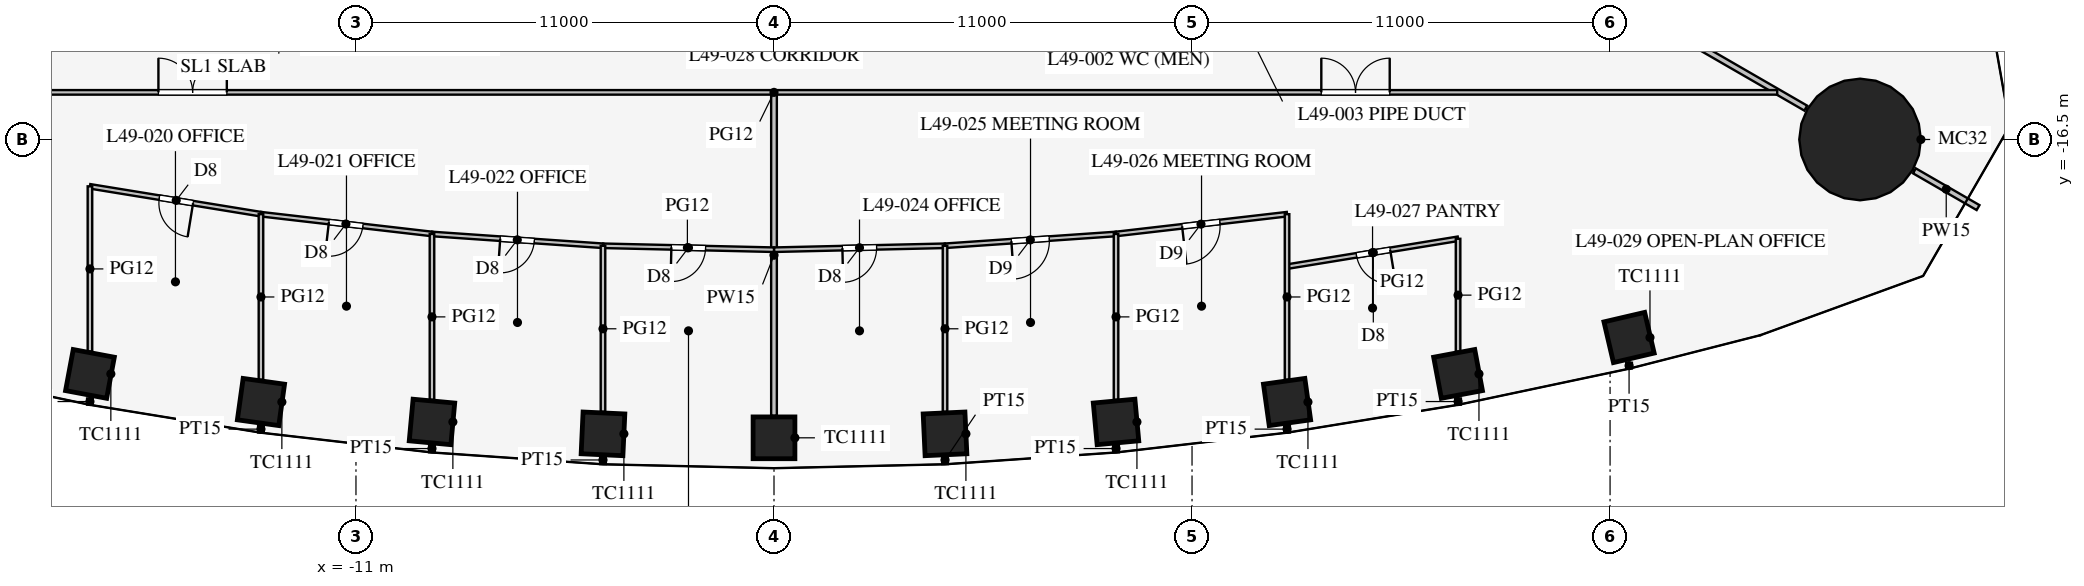
"""IFC4 building model, lengths in metres.
Left out: names, types, materials, properties, quantities, classifications, styles, units other than length and angle.
Written with IfcOpenShell. Run it as: python <this file> out.ifc"""

import sys

from ifc_helpers import new_model, si_unit, direction, frame, frame_2d, origin, origin_2d, place, context, subcontext, project, spatial, rectangle, circle, extrude, element, fill, save


model = new_model("IFC4")
c1 = context("Model", 3, precision=1e-05, world=origin(), true_north=direction((0.0, 1.0)))
c2 = subcontext(c1, "Body", "Model", "MODEL_VIEW")
j1 = project(units=[si_unit("LENGTHUNIT", "METRE"), si_unit("PLANEANGLEUNIT", "RADIAN")], contexts=[c1])
p1 = place(None, origin())
s1 = spatial("IfcSite", under=j1, at=p1, CompositionType="ELEMENT")
p2 = place(p1, origin())
s2 = spatial("IfcBuilding", under=s1, at=p2, CompositionType="ELEMENT")
p3 = place(p2, frame((0.0, 0.0, 214.9)))
s3 = spatial("IfcBuildingStorey", under=s2, at=p3, CompositionType="ELEMENT", Elevation=214.9)
for number, where, z_axis, x_axis in (
    (1, (-18.0, -22.669, 0.0), (0.0, 0.0, 1.0), (0.983, -0.184, 0.0)),
    (2, (-13.5, -23.408, 0.0), (0.0, 0.0, 1.0), (0.99, -0.138, 0.0)),
    (3, (-9.0, -23.933, 0.0), (0.0, 0.0, 1.0), (0.996, -0.092, 0.0)),
    (4, (-4.5, -24.246, 0.0), (0.0, 0.0, 1.0), (0.999, -0.046, 0.0)),
    (5, (0.0, -24.351, 0.0), (0.0, 0.0, 1.0), (1.0, 0.0, 0.0)),
    (6, (4.5, -24.246, 0.0), (0.0, 0.0, 1.0), (0.999, 0.046, 0.0)),
    (7, (9.0, -23.933, 0.0), (0.0, 0.0, 1.0), (0.996, 0.092, 0.0)),
    (8, (13.5, -23.408, 0.0), (0.0, 0.0, 1.0), (0.99, 0.138, 0.0)),
    (9, (18.0, -22.669, 0.0), (0.0, 0.0, 1.0), (0.983, 0.184, 0.0)),
    (10, (22.5, -21.71, 0.0), (0.0, 0.0, 1.0), (0.974, 0.227, 0.0)),
):
    element("IfcColumn", number, at=place(p3, frame(where, z_axis=z_axis, x_axis=x_axis)), inside=s3, PredefinedType="COLUMN", context=c2, shape_type="SweptSolid", body=[
        extrude(rectangle(XDim=1.1, YDim=1.1, at=origin_2d()), origin(), (0.0, 0.0, 1.0), 4.2),
    ])
p4 = place(p3, frame((28.579, -16.5, 0.0), z_axis=(0.0, 0.0, 1.0), x_axis=(1.0, 0.0, 0.0)))
e11 = element("IfcColumn", 11, at=p4, inside=s3, PredefinedType="COLUMN", context=c2, shape_type="SweptSolid", body=[
    extrude(circle(Radius=1.6, at=origin_2d()), origin(), (0.0, 0.0, 1.0), 4.2),
])
p5 = place(p3, frame((14.203, -8.2, 0.0), z_axis=(0.0, 0.0, 1.0), x_axis=(0.866021600284, -0.500006587798, 0.0)))
e12 = element("IfcWall", 12, at=p5, inside=s3, PredefinedType="PARTITIONING", context=c2, shape_type="SweptSolid", body=[
    extrude(rectangle(XDim=14.95, YDim=0.15, at=frame_2d((7.475, 0.0))), origin(), (0.0, 0.0, 1.0), 2.4),
])
p6 = place(p3, frame((30.008, -17.325, 0.0), z_axis=(0.0, 0.0, 1.0), x_axis=(0.866013246922, -0.500021055713, 0.0)))
e13 = element("IfcWall", 13, at=p6, inside=s3, PredefinedType="PARTITIONING", context=c2, shape_type="SweptSolid", body=[
    extrude(rectangle(XDim=1.935, YDim=0.15, at=frame_2d((0.967, 0.0))), origin(), (0.0, 0.0, 1.0), 2.4),
])
p7 = place(p3, frame((-14.203, -8.2, 0.0), z_axis=(0.0, 0.0, 1.0), x_axis=(-0.866021600284, -0.500006587798, 0.0)))
e14 = element("IfcWall", 14, at=p7, inside=s3, PredefinedType="PARTITIONING", context=c2, shape_type="SweptSolid", body=[
    extrude(rectangle(XDim=14.95, YDim=0.15, at=frame_2d((7.475, 0.0))), origin(), (0.0, 0.0, 1.0), 2.4),
])
p8 = place(p3, frame((0.0, -15.32, 0.0), z_axis=(0.0, 0.0, 1.0), x_axis=(0.0, -1.0, 0.0)))
e15 = element("IfcWall", 15, at=p8, inside=s3, PredefinedType="PARTITIONING", context=c2, shape_type="SweptSolid", body=[
    extrude(rectangle(XDim=8.451, YDim=0.15, at=frame_2d((4.225, 0.0))), origin(), (0.0, 0.0, 1.0), 3.3),
])
p9 = place(p3, frame((-26.398, -15.26, 0.0), z_axis=(0.0, 0.0, 1.0), x_axis=(1.0, 0.0, 0.0)))
e16 = element("IfcWall", 16, at=p9, inside=s3, PredefinedType="PARTITIONING", context=c2, shape_type="SweptSolid", body=[
    extrude(rectangle(XDim=52.796, YDim=0.12, at=frame_2d((26.398, 0.0))), origin(), (0.0, 0.0, 1.0), 2.9),
])
p10 = place(p9, frame((10.2, 0.0, 0.15)))
e17 = element("IfcOpeningElement", 17, at=p10, cuts=e16, PredefinedType="OPENING", context=c2, shape_type="SweptSolid", body=[
    extrude(rectangle(XDim=1.8, YDim=2.1, at=frame_2d((0.9, 1.05))), frame((0.0, 0.07, 0.0), z_axis=(0.0, -1.0, 0.0), x_axis=(1.0, 0.0, 0.0)), (0.0, 0.0, 1.0), 0.14),
])
p11 = place(p9, frame((40.8, 0.0, 0.15)))
e18 = element("IfcOpeningElement", 18, at=p11, cuts=e16, PredefinedType="OPENING", context=c2, shape_type="SweptSolid", body=[
    extrude(rectangle(XDim=1.8, YDim=2.1, at=frame_2d((0.9, 1.05))), frame((0.0, 0.07, 0.0), z_axis=(0.0, -1.0, 0.0), x_axis=(1.0, 0.0, 0.0)), (0.0, 0.0, 1.0), 0.14),
])
p12 = place(p3, frame((13.5, -24.033, 0.0), z_axis=(0.0, 0.0, 1.0), x_axis=(0.0, -1.0, 0.0)))
e19 = element("IfcWall", 19, at=p12, inside=s3, PredefinedType="PARTITIONING", context=c2, shape_type="SweptSolid", body=[
    extrude(rectangle(XDim=0.178, YDim=0.15, at=frame_2d((0.089, 0.0))), origin(), (0.0, 0.0, 1.0), 2.9),
])
p13 = place(p3, frame((18.0, -23.315, 0.0), z_axis=(0.0, 0.0, 1.0), x_axis=(0.0, -1.0, 0.0)))
e20 = element("IfcWall", 20, at=p13, inside=s3, PredefinedType="PARTITIONING", context=c2, shape_type="SweptSolid", body=[
    extrude(rectangle(XDim=0.163, YDim=0.15, at=frame_2d((0.082, 0.0))), origin(), (0.0, 0.0, 1.0), 2.9),
])
p14 = place(p3, frame((22.5, -22.375, 0.0), z_axis=(0.0, 0.0, 1.0), x_axis=(0.0, -1.0, 0.0)))
e21 = element("IfcWall", 21, at=p14, inside=s3, PredefinedType="PARTITIONING", context=c2, shape_type="SweptSolid", body=[
    extrude(rectangle(XDim=0.152, YDim=0.15, at=frame_2d((0.076, 0.0))), origin(), (0.0, 0.0, 1.0), 2.9),
])
p15 = place(p3, frame((4.5, -24.825, 0.0), z_axis=(0.0, 0.0, 1.0), x_axis=(0.0, -1.0, 0.0)))
e22 = element("IfcWall", 22, at=p15, inside=s3, PredefinedType="PARTITIONING", context=c2, shape_type="SweptSolid", body=[
    extrude(rectangle(XDim=0.217, YDim=0.15, at=frame_2d((0.108, 0.0))), origin(), (0.0, 0.0, 1.0), 2.9),
])
p16 = place(p3, frame((9.0, -24.535, 0.0), z_axis=(0.0, 0.0, 1.0), x_axis=(0.0, -1.0, 0.0)))
e23 = element("IfcWall", 23, at=p16, inside=s3, PredefinedType="PARTITIONING", context=c2, shape_type="SweptSolid", body=[
    extrude(rectangle(XDim=0.196, YDim=0.15, at=frame_2d((0.098, 0.0))), origin(), (0.0, 0.0, 1.0), 2.9),
])
p17 = place(p3, frame((-13.5, -24.033, 0.0), z_axis=(0.0, 0.0, 1.0), x_axis=(0.0, -1.0, 0.0)))
e24 = element("IfcWall", 24, at=p17, inside=s3, PredefinedType="PARTITIONING", context=c2, shape_type="SweptSolid", body=[
    extrude(rectangle(XDim=0.178, YDim=0.15, at=frame_2d((0.089, 0.0))), origin(), (0.0, 0.0, 1.0), 2.9),
])
p18 = place(p3, frame((-18.0, -23.315, 0.0), z_axis=(0.0, 0.0, 1.0), x_axis=(0.0, -1.0, 0.0)))
e25 = element("IfcWall", 25, at=p18, inside=s3, PredefinedType="PARTITIONING", context=c2, shape_type="SweptSolid", body=[
    extrude(rectangle(XDim=0.163, YDim=0.15, at=frame_2d((0.082, 0.0))), origin(), (0.0, 0.0, 1.0), 2.9),
])
p19 = place(p3, frame((-4.5, -24.825, 0.0), z_axis=(0.0, 0.0, 1.0), x_axis=(0.0, -1.0, 0.0)))
e26 = element("IfcWall", 26, at=p19, inside=s3, PredefinedType="PARTITIONING", context=c2, shape_type="SweptSolid", body=[
    extrude(rectangle(XDim=0.217, YDim=0.15, at=frame_2d((0.108, 0.0))), origin(), (0.0, 0.0, 1.0), 2.9),
])
p20 = place(p3, frame((-9.0, -24.535, 0.0), z_axis=(0.0, 0.0, 1.0), x_axis=(0.0, -1.0, 0.0)))
e27 = element("IfcWall", 27, at=p20, inside=s3, PredefinedType="PARTITIONING", context=c2, shape_type="SweptSolid", body=[
    extrude(rectangle(XDim=0.196, YDim=0.15, at=frame_2d((0.098, 0.0))), origin(), (0.0, 0.0, 1.0), 2.9),
])
p21 = place(p3, frame((0.0, -19.401, 0.0), z_axis=(0.0, 0.0, 1.0), x_axis=(0.99973552509, 0.022997388381, 0.0)))
e28 = element("IfcWall", 28, at=p21, inside=s3, PredefinedType="PARTITIONING", context=c2, shape_type="SweptSolid", body=[
    extrude(rectangle(XDim=4.501, YDim=0.12, at=frame_2d((2.25, 0.0))), origin(), (0.0, 0.0, 1.0), 2.9),
])
p22 = place(p21, frame((1.8, 0.0, 0.15)))
e29 = element("IfcOpeningElement", 29, at=p22, cuts=e28, PredefinedType="OPENING", context=c2, shape_type="SweptSolid", body=[
    extrude(rectangle(XDim=0.9, YDim=2.1, at=frame_2d((0.45, 1.05))), frame((0.0, 0.07, 0.0), z_axis=(0.0, -1.0, 0.0), x_axis=(1.0, 0.0, 0.0)), (0.0, 0.0, 1.0), 0.14),
])
p23 = place(p3, frame((13.5, -19.846, 0.0), z_axis=(0.0, 0.0, 1.0), x_axis=(0.986986525477, 0.160802980469, 0.0)))
e30 = element("IfcWall", 30, at=p23, inside=s3, PredefinedType="PARTITIONING", context=c2, shape_type="SweptSolid", body=[
    extrude(rectangle(XDim=4.559, YDim=0.12, at=frame_2d((2.28, 0.0))), origin(), (0.0, 0.0, 1.0), 2.9),
])
p24 = place(p23, frame((1.85, 0.0, 0.15)))
e31 = element("IfcOpeningElement", 31, at=p24, cuts=e30, PredefinedType="OPENING", context=c2, shape_type="SweptSolid", body=[
    extrude(rectangle(XDim=0.9, YDim=2.1, at=frame_2d((0.45, 1.05))), frame((0.0, 0.07, 0.0), z_axis=(0.0, -1.0, 0.0), x_axis=(1.0, 0.0, 0.0)), (0.0, 0.0, 1.0), 0.14),
])
p25 = place(p3, frame((4.5, -19.297, 0.0), z_axis=(0.0, 0.0, 1.0), x_axis=(0.997623533978, 0.068900540297, 0.0)))
e32 = element("IfcWall", 32, at=p25, inside=s3, PredefinedType="PARTITIONING", context=c2, shape_type="SweptSolid", body=[
    extrude(rectangle(XDim=4.511, YDim=0.12, at=frame_2d((2.255, 0.0))), origin(), (0.0, 0.0, 1.0), 2.9),
])
p26 = place(p25, frame((1.75, 0.0, 0.15)))
e33 = element("IfcOpeningElement", 33, at=p26, cuts=e32, PredefinedType="OPENING", context=c2, shape_type="SweptSolid", body=[
    extrude(rectangle(XDim=1.0, YDim=2.1, at=frame_2d((0.5, 1.05))), frame((0.0, 0.07, 0.0), z_axis=(0.0, -1.0, 0.0), x_axis=(1.0, 0.0, 0.0)), (0.0, 0.0, 1.0), 0.14),
])
p27 = place(p3, frame((9.0, -18.986, 0.0), z_axis=(0.0, 0.0, 1.0), x_axis=(0.993382946625, 0.114849124309, 0.0)))
e34 = element("IfcWall", 34, at=p27, inside=s3, PredefinedType="PARTITIONING", context=c2, shape_type="SweptSolid", body=[
    extrude(rectangle(XDim=4.53, YDim=0.12, at=frame_2d((2.265, 0.0))), origin(), (0.0, 0.0, 1.0), 2.9),
])
p28 = place(p27, frame((1.75, 0.0, 0.15)))
e35 = element("IfcOpeningElement", 35, at=p28, cuts=e34, PredefinedType="OPENING", context=c2, shape_type="SweptSolid", body=[
    extrude(rectangle(XDim=1.0, YDim=2.1, at=frame_2d((0.5, 1.05))), frame((0.0, 0.07, 0.0), z_axis=(0.0, -1.0, 0.0), x_axis=(1.0, 0.0, 0.0)), (0.0, 0.0, 1.0), 0.14),
])
p29 = place(p3, frame((-13.5, -18.466, 0.0), z_axis=(0.0, 0.0, 1.0), x_axis=(0.993382946625, -0.114849124309, 0.0)))
e36 = element("IfcWall", 36, at=p29, inside=s3, PredefinedType="PARTITIONING", context=c2, shape_type="SweptSolid", body=[
    extrude(rectangle(XDim=4.53, YDim=0.12, at=frame_2d((2.265, 0.0))), origin(), (0.0, 0.0, 1.0), 2.9),
])
p30 = place(p29, frame((1.8, 0.0, 0.15)))
e37 = element("IfcOpeningElement", 37, at=p30, cuts=e36, PredefinedType="OPENING", context=c2, shape_type="SweptSolid", body=[
    extrude(rectangle(XDim=0.9, YDim=2.1, at=frame_2d((0.45, 1.05))), frame((0.0, 0.07, 0.0), z_axis=(0.0, -1.0, 0.0), x_axis=(1.0, 0.0, 0.0)), (0.0, 0.0, 1.0), 0.14),
])
p31 = place(p3, frame((-18.0, -17.733, 0.0), z_axis=(0.0, 0.0, 1.0), x_axis=(0.986986525477, -0.160802980469, 0.0)))
e38 = element("IfcWall", 38, at=p31, inside=s3, PredefinedType="PARTITIONING", context=c2, shape_type="SweptSolid", body=[
    extrude(rectangle(XDim=4.559, YDim=0.12, at=frame_2d((2.28, 0.0))), origin(), (0.0, 0.0, 1.0), 2.9),
])
p32 = place(p31, frame((1.85, 0.0, 0.15)))
e39 = element("IfcOpeningElement", 39, at=p32, cuts=e38, PredefinedType="OPENING", context=c2, shape_type="SweptSolid", body=[
    extrude(rectangle(XDim=0.9, YDim=2.1, at=frame_2d((0.45, 1.05))), frame((0.0, 0.07, 0.0), z_axis=(0.0, -1.0, 0.0), x_axis=(1.0, 0.0, 0.0)), (0.0, 0.0, 1.0), 0.14),
])
p33 = place(p3, frame((-4.5, -19.297, 0.0), z_axis=(0.0, 0.0, 1.0), x_axis=(0.99973552509, -0.022997388381, 0.0)))
e40 = element("IfcWall", 40, at=p33, inside=s3, PredefinedType="PARTITIONING", context=c2, shape_type="SweptSolid", body=[
    extrude(rectangle(XDim=4.501, YDim=0.12, at=frame_2d((2.25, 0.0))), origin(), (0.0, 0.0, 1.0), 2.9),
])
p34 = place(p33, frame((1.8, 0.0, 0.15)))
e41 = element("IfcOpeningElement", 41, at=p34, cuts=e40, PredefinedType="OPENING", context=c2, shape_type="SweptSolid", body=[
    extrude(rectangle(XDim=0.9, YDim=2.1, at=frame_2d((0.45, 1.05))), frame((0.0, 0.07, 0.0), z_axis=(0.0, -1.0, 0.0), x_axis=(1.0, 0.0, 0.0)), (0.0, 0.0, 1.0), 0.14),
])
p35 = place(p3, frame((-9.0, -18.986, 0.0), z_axis=(0.0, 0.0, 1.0), x_axis=(0.997623533978, -0.068900540297, 0.0)))
e42 = element("IfcWall", 42, at=p35, inside=s3, PredefinedType="PARTITIONING", context=c2, shape_type="SweptSolid", body=[
    extrude(rectangle(XDim=4.511, YDim=0.12, at=frame_2d((2.255, 0.0))), origin(), (0.0, 0.0, 1.0), 2.9),
])
p36 = place(p35, frame((1.8, 0.0, 0.15)))
e43 = element("IfcOpeningElement", 43, at=p36, cuts=e42, PredefinedType="OPENING", context=c2, shape_type="SweptSolid", body=[
    extrude(rectangle(XDim=0.9, YDim=2.1, at=frame_2d((0.45, 1.05))), frame((0.0, 0.07, 0.0), z_axis=(0.0, -1.0, 0.0), x_axis=(1.0, 0.0, 0.0)), (0.0, 0.0, 1.0), 0.14),
])
p37 = place(p3, frame((13.5, -18.466, 0.0), z_axis=(0.0, 0.0, 1.0), x_axis=(0.0, -1.0, 0.0)))
e44 = element("IfcWall", 44, at=p37, inside=s3, PredefinedType="PARTITIONING", context=c2, shape_type="SweptSolid", body=[
    extrude(rectangle(XDim=4.357, YDim=0.12, at=frame_2d((2.178, 0.0))), origin(), (0.0, 0.0, 1.0), 2.9),
])
p38 = place(p3, frame((18.0, -19.113, 0.0), z_axis=(0.0, 0.0, 1.0), x_axis=(0.0, -1.0, 0.0)))
e45 = element("IfcWall", 45, at=p38, inside=s3, PredefinedType="PARTITIONING", context=c2, shape_type="SweptSolid", body=[
    extrude(rectangle(XDim=2.966, YDim=0.12, at=frame_2d((1.483, 0.0))), origin(), (0.0, 0.0, 1.0), 2.9),
])
p39 = place(p3, frame((4.5, -19.297, 0.0), z_axis=(0.0, 0.0, 1.0), x_axis=(0.0, -1.0, 0.0)))
e46 = element("IfcWall", 46, at=p39, inside=s3, PredefinedType="PARTITIONING", context=c2, shape_type="SweptSolid", body=[
    extrude(rectangle(XDim=4.369, YDim=0.12, at=frame_2d((2.184, 0.0))), origin(), (0.0, 0.0, 1.0), 2.9),
])
p40 = place(p3, frame((9.0, -18.986, 0.0), z_axis=(0.0, 0.0, 1.0), x_axis=(0.0, -1.0, 0.0)))
e47 = element("IfcWall", 47, at=p40, inside=s3, PredefinedType="PARTITIONING", context=c2, shape_type="SweptSolid", body=[
    extrude(rectangle(XDim=4.364, YDim=0.12, at=frame_2d((2.182, 0.0))), origin(), (0.0, 0.0, 1.0), 2.9),
])
p41 = place(p3, frame((-13.5, -18.466, 0.0), z_axis=(0.0, 0.0, 1.0), x_axis=(0.0, -1.0, 0.0)))
e48 = element("IfcWall", 48, at=p41, inside=s3, PredefinedType="PARTITIONING", context=c2, shape_type="SweptSolid", body=[
    extrude(rectangle(XDim=4.357, YDim=0.12, at=frame_2d((2.178, 0.0))), origin(), (0.0, 0.0, 1.0), 2.9),
])
p42 = place(p3, frame((-18.0, -17.733, 0.0), z_axis=(0.0, 0.0, 1.0), x_axis=(0.0, -1.0, 0.0)))
e49 = element("IfcWall", 49, at=p42, inside=s3, PredefinedType="PARTITIONING", context=c2, shape_type="SweptSolid", body=[
    extrude(rectangle(XDim=4.346, YDim=0.12, at=frame_2d((2.173, 0.0))), origin(), (0.0, 0.0, 1.0), 2.9),
])
p43 = place(p3, frame((-4.5, -19.297, 0.0), z_axis=(0.0, 0.0, 1.0), x_axis=(0.0, -1.0, 0.0)))
e50 = element("IfcWall", 50, at=p43, inside=s3, PredefinedType="PARTITIONING", context=c2, shape_type="SweptSolid", body=[
    extrude(rectangle(XDim=4.369, YDim=0.12, at=frame_2d((2.184, 0.0))), origin(), (0.0, 0.0, 1.0), 2.9),
])
p44 = place(p3, frame((-9.0, -18.986, 0.0), z_axis=(0.0, 0.0, 1.0), x_axis=(0.0, -1.0, 0.0)))
e51 = element("IfcWall", 51, at=p44, inside=s3, PredefinedType="PARTITIONING", context=c2, shape_type="SweptSolid", body=[
    extrude(rectangle(XDim=4.364, YDim=0.12, at=frame_2d((2.182, 0.0))), origin(), (0.0, 0.0, 1.0), 2.9),
])
p45 = place(p3, frame((-0.016, 30.491, 0.0), z_axis=(0.0, 0.0, 1.0), x_axis=(-0.50000091641, -0.866024874695, 0.0)))
e52 = element("IfcWall", 52, at=p45, inside=s3, PredefinedType="PARTITIONING", context=c2, shape_type="SweptSolid", body=[
    extrude(rectangle(XDim=52.796, YDim=0.12, at=frame_2d((26.398, 0.0))), origin(), (0.0, 0.0, 1.0), 2.9),
])
p46 = place(p45, frame((10.2, 0.0, 0.15)))
e53 = element("IfcOpeningElement", 53, at=p46, cuts=e52, PredefinedType="OPENING", context=c2, shape_type="SweptSolid", body=[
    extrude(rectangle(XDim=1.8, YDim=2.1, at=frame_2d((0.9, 1.05))), frame((0.0, 0.07, 0.0), z_axis=(0.0, -1.0, 0.0), x_axis=(1.0, 0.0, 0.0)), (0.0, 0.0, 1.0), 0.14),
])
p47 = place(p45, frame((40.8, 0.0, 0.15)))
e54 = element("IfcOpeningElement", 54, at=p47, cuts=e52, PredefinedType="OPENING", context=c2, shape_type="SweptSolid", body=[
    extrude(rectangle(XDim=1.8, YDim=2.1, at=frame_2d((0.9, 1.05))), frame((0.0, 0.07, 0.0), z_axis=(0.0, -1.0, 0.0), x_axis=(1.0, 0.0, 0.0)), (0.0, 0.0, 1.0), 0.14),
])
p48 = place(p32, frame((0.9, 0.0, 0.0), z_axis=(0.0, 0.0, 1.0), x_axis=(-1.0, 0.0, 0.0)))
e55 = element("IfcDoor", 55, at=p48, inside=s3, OperationType="SINGLE_SWING_LEFT", PredefinedType="DOOR", context=c2, shape_type="SweptSolid", body=[
    extrude(rectangle(XDim=0.9, YDim=2.1, at=frame_2d((0.45, 1.05))), frame((0.0, 0.025, 0.0), z_axis=(0.0, -1.0, 0.0), x_axis=(1.0, 0.0, 0.0)), (0.0, 0.0, 1.0), 0.05),
])
fill(e39, e55)
p49 = place(p30, frame((0.9, 0.0, 0.0), z_axis=(0.0, 0.0, 1.0), x_axis=(-1.0, 0.0, 0.0)))
e56 = element("IfcDoor", 56, at=p49, inside=s3, OperationType="SINGLE_SWING_RIGHT", PredefinedType="DOOR", context=c2, shape_type="SweptSolid", body=[
    extrude(rectangle(XDim=0.9, YDim=2.1, at=frame_2d((0.45, 1.05))), frame((0.0, 0.025, 0.0), z_axis=(0.0, -1.0, 0.0), x_axis=(1.0, 0.0, 0.0)), (0.0, 0.0, 1.0), 0.05),
])
fill(e37, e56)
p50 = place(p36, frame((0.9, 0.0, 0.0), z_axis=(0.0, 0.0, 1.0), x_axis=(-1.0, 0.0, 0.0)))
e57 = element("IfcDoor", 57, at=p50, inside=s3, OperationType="SINGLE_SWING_RIGHT", PredefinedType="DOOR", context=c2, shape_type="SweptSolid", body=[
    extrude(rectangle(XDim=0.9, YDim=2.1, at=frame_2d((0.45, 1.05))), frame((0.0, 0.025, 0.0), z_axis=(0.0, -1.0, 0.0), x_axis=(1.0, 0.0, 0.0)), (0.0, 0.0, 1.0), 0.05),
])
fill(e43, e57)
p51 = place(p34, frame((0.9, 0.0, 0.0), z_axis=(0.0, 0.0, 1.0), x_axis=(-1.0, 0.0, 0.0)))
e58 = element("IfcDoor", 58, at=p51, inside=s3, OperationType="SINGLE_SWING_RIGHT", PredefinedType="DOOR", context=c2, shape_type="SweptSolid", body=[
    extrude(rectangle(XDim=0.9, YDim=2.1, at=frame_2d((0.45, 1.05))), frame((0.0, 0.025, 0.0), z_axis=(0.0, -1.0, 0.0), x_axis=(1.0, 0.0, 0.0)), (0.0, 0.0, 1.0), 0.05),
])
fill(e41, e58)
p52 = place(p22, frame((0.9, 0.0, 0.0), z_axis=(0.0, 0.0, 1.0), x_axis=(-1.0, 0.0, 0.0)))
e59 = element("IfcDoor", 59, at=p52, inside=s3, OperationType="SINGLE_SWING_RIGHT", PredefinedType="DOOR", context=c2, shape_type="SweptSolid", body=[
    extrude(rectangle(XDim=0.9, YDim=2.1, at=frame_2d((0.45, 1.05))), frame((0.0, 0.025, 0.0), z_axis=(0.0, -1.0, 0.0), x_axis=(1.0, 0.0, 0.0)), (0.0, 0.0, 1.0), 0.05),
])
fill(e29, e59)
p53 = place(p26, frame((1.0, 0.0, 0.0), z_axis=(0.0, 0.0, 1.0), x_axis=(-1.0, 0.0, 0.0)))
e60 = element("IfcDoor", 60, at=p53, inside=s3, OperationType="SINGLE_SWING_RIGHT", PredefinedType="DOOR", context=c2, shape_type="SweptSolid", body=[
    extrude(rectangle(XDim=1.0, YDim=2.1, at=frame_2d((0.5, 1.05))), frame((0.0, 0.025, 0.0), z_axis=(0.0, -1.0, 0.0), x_axis=(1.0, 0.0, 0.0)), (0.0, 0.0, 1.0), 0.05),
])
fill(e33, e60)
p54 = place(p28, frame((1.0, 0.0, 0.0), z_axis=(0.0, 0.0, 1.0), x_axis=(-1.0, 0.0, 0.0)))
e61 = element("IfcDoor", 61, at=p54, inside=s3, OperationType="SINGLE_SWING_RIGHT", PredefinedType="DOOR", context=c2, shape_type="SweptSolid", body=[
    extrude(rectangle(XDim=1.0, YDim=2.1, at=frame_2d((0.5, 1.05))), frame((0.0, 0.025, 0.0), z_axis=(0.0, -1.0, 0.0), x_axis=(1.0, 0.0, 0.0)), (0.0, 0.0, 1.0), 0.05),
])
fill(e35, e61)
p55 = place(p24, frame((0.9, 0.0, 0.0), z_axis=(0.0, 0.0, 1.0), x_axis=(-1.0, 0.0, 0.0)))
e62 = element("IfcDoor", 62, at=p55, inside=s3, OperationType="SINGLE_SWING_LEFT", PredefinedType="DOOR", context=c2, shape_type="SweptSolid", body=[
    extrude(rectangle(XDim=0.9, YDim=2.1, at=frame_2d((0.45, 1.05))), frame((0.0, 0.025, 0.0), z_axis=(0.0, -1.0, 0.0), x_axis=(1.0, 0.0, 0.0)), (0.0, 0.0, 1.0), 0.05),
])
fill(e31, e62)
p56 = place(p10, origin())
e63 = element("IfcDoor", 63, at=p56, inside=s3, OperationType="DOUBLE_DOOR_SINGLE_SWING", PredefinedType="DOOR", context=c2, shape_type="SweptSolid", body=[
    extrude(rectangle(XDim=1.8, YDim=2.1, at=frame_2d((0.9, 1.05))), frame((0.0, 0.025, 0.0), z_axis=(0.0, -1.0, 0.0), x_axis=(1.0, 0.0, 0.0)), (0.0, 0.0, 1.0), 0.05),
])
fill(e17, e63)
p57 = place(p11, origin())
e64 = element("IfcDoor", 64, at=p57, inside=s3, OperationType="DOUBLE_DOOR_SINGLE_SWING", PredefinedType="DOOR", context=c2, shape_type="SweptSolid", body=[
    extrude(rectangle(XDim=1.8, YDim=2.1, at=frame_2d((0.9, 1.05))), frame((0.0, 0.025, 0.0), z_axis=(0.0, -1.0, 0.0), x_axis=(1.0, 0.0, 0.0)), (0.0, 0.0, 1.0), 0.05),
])
fill(e18, e64)
save(model, sys.argv[1])
